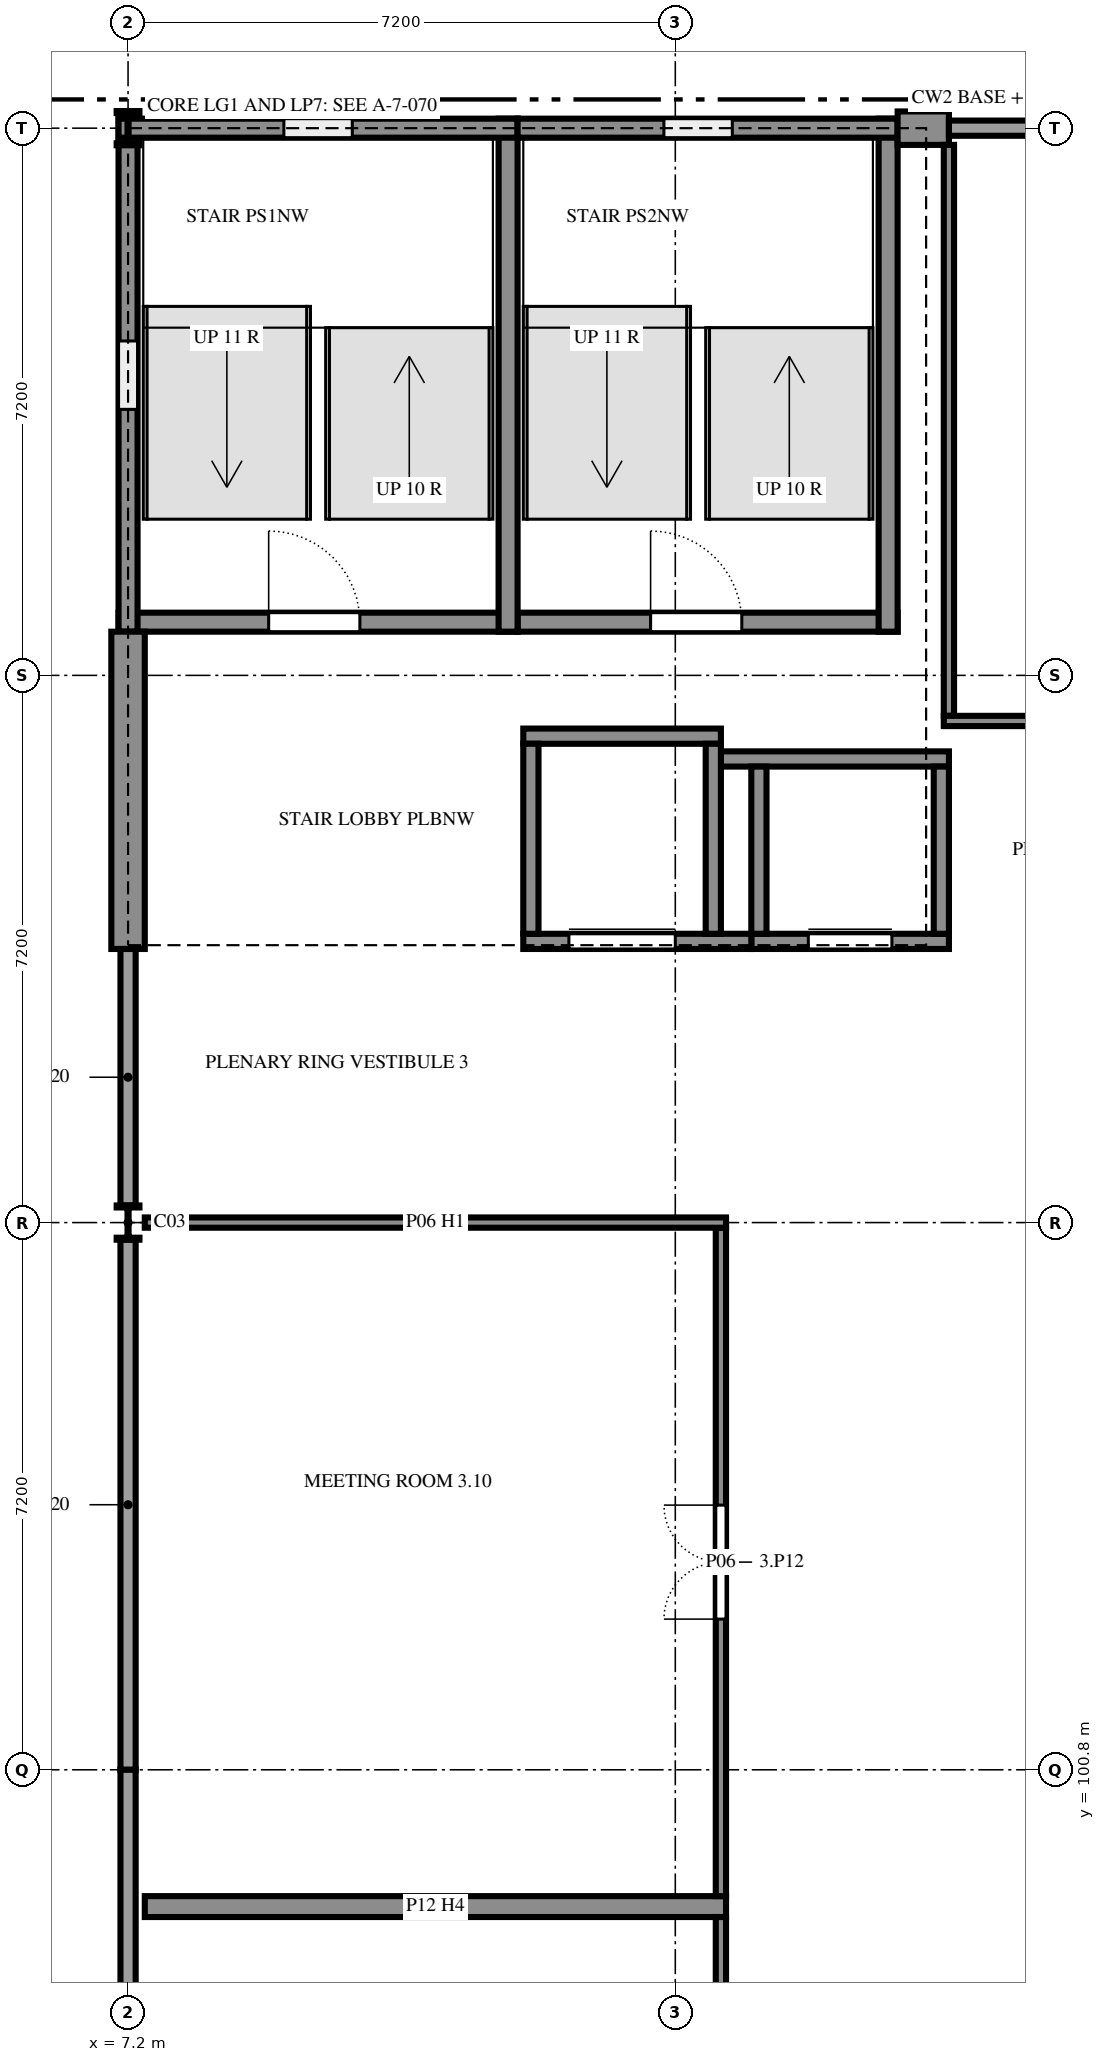
"""IFC4 building model, lengths in metres.
Left out: names, types, materials, properties, quantities, classifications, styles, units other than length and angle.
Written with IfcOpenShell. Run it as: python <this file> out.ifc"""

import sys

from ifc_helpers import new_model, si_unit, direction, frame, frame_2d, origin, origin_2d, place, context, subcontext, project, spatial, rectangle, i_section, extrude, element, fill, save


model = new_model("IFC4")
c1 = context("Model", 3, precision=1e-05, world=origin(), true_north=direction((0.0, 1.0)))
c2 = subcontext(c1, "Body", "Model", "MODEL_VIEW")
j1 = project(units=[si_unit("LENGTHUNIT", "METRE"), si_unit("PLANEANGLEUNIT", "RADIAN")], contexts=[c1])
p1 = place(None, origin())
s1 = spatial("IfcSite", under=j1, at=p1, CompositionType="ELEMENT")
p2 = place(p1, origin())
s2 = spatial("IfcBuilding", under=s1, at=p2, CompositionType="ELEMENT")
p3 = place(p2, frame((0.0, 0.0, 10.8)))
s3 = spatial("IfcBuildingStorey", under=s2, at=p3, CompositionType="ELEMENT", Elevation=10.8)
for number, where, z_axis, x_axis in (
    (1, (7.2, 108.0, 0.0), (0.0, 0.0, 1.0), (1.0, 0.0, 0.0)),
    (2, (7.2, 122.4, 0.0), (0.0, 0.0, 1.0), (1.0, 0.0, 0.0)),
):
    element("IfcColumn", number, at=place(p3, frame(where, z_axis=z_axis, x_axis=x_axis)), inside=s3, PredefinedType="COLUMN", context=c2, shape_type="SweptSolid", body=[
        extrude(i_section(OverallWidth=0.3, OverallDepth=0.45, WebThickness=0.014, FlangeThickness=0.026, FilletRadius=0.027, at=origin_2d()), origin(), (0.0, 0.0, 1.0), 3.6),
    ])
p4 = place(p3, frame((7.075, 115.9, 0.0), z_axis=(0.0, 0.0, 1.0), x_axis=(1.0, 0.0, 0.0)))
e3 = element("IfcWall", 3, at=p4, inside=s3, PredefinedType="SHEAR", context=c2, shape_type="SweptSolid", body=[
    extrude(rectangle(XDim=5.25, YDim=0.25, at=frame_2d((2.625, 0.0))), origin(), (0.0, 0.0, 1.0), 3.6),
])
p5 = place(p4, frame((1.975, 0.0, 0.0)))
e4 = element("IfcOpeningElement", 4, at=p5, cuts=e3, PredefinedType="OPENING", context=c2, shape_type="SweptSolid", body=[
    extrude(rectangle(XDim=1.2, YDim=2.4, at=frame_2d((0.6, 1.2))), frame((0.0, 0.135, 0.0), z_axis=(0.0, -1.0, 0.0), x_axis=(1.0, 0.0, 0.0)), (0.0, 0.0, 1.0), 0.27),
])
p6 = place(p3, frame((12.325, 115.9, 0.0), z_axis=(0.0, 0.0, 1.0), x_axis=(1.0, 0.0, 0.0)))
e5 = element("IfcWall", 5, at=p6, inside=s3, PredefinedType="SHEAR", context=c2, shape_type="SweptSolid", body=[
    extrude(rectangle(XDim=5.0, YDim=0.25, at=frame_2d((2.5, 0.0))), origin(), (0.0, 0.0, 1.0), 3.6),
])
p7 = place(p6, frame((1.75, 0.0, 0.0)))
e6 = element("IfcOpeningElement", 6, at=p7, cuts=e5, PredefinedType="OPENING", context=c2, shape_type="SweptSolid", body=[
    extrude(rectangle(XDim=1.2, YDim=2.4, at=frame_2d((0.6, 1.2))), frame((0.0, 0.135, 0.0), z_axis=(0.0, -1.0, 0.0), x_axis=(1.0, 0.0, 0.0)), (0.0, 0.0, 1.0), 0.27),
])
for number, where, z_axis, x_axis in (
    (7, (12.2, 115.775, 0.0), (0.0, 0.0, 1.0), (0.0, 1.0, 0.0)),
    (8, (17.2, 115.775, 0.0), (0.0, 0.0, 1.0), (0.0, 1.0, 0.0)),
):
    element("IfcWall", number, at=place(p3, frame(where, z_axis=z_axis, x_axis=x_axis)), inside=s3, PredefinedType="SHEAR", context=c2, shape_type="SweptSolid", body=[
        extrude(rectangle(XDim=6.75, YDim=0.25, at=frame_2d((3.375, 0.0))), origin(), (0.0, 0.0, 1.0), 3.6),
    ])
p8 = place(p3, frame((7.2, 122.525, 0.0), z_axis=(0.0, 0.0, 1.0), x_axis=(0.0, -1.0, 0.0)))
e9 = element("IfcWall", 9, at=p8, inside=s3, PredefinedType="SHEAR", context=c2, shape_type="SweptSolid", body=[
    extrude(rectangle(XDim=6.75, YDim=0.25, at=frame_2d((3.375, 0.0))), origin(), (0.0, 0.0, 1.0), 3.6),
])
p9 = place(p8, frame((2.925, 0.0, 0.6)))
e10 = element("IfcOpeningElement", 10, at=p9, cuts=e9, PredefinedType="OPENING", context=c2, shape_type="SweptSolid", body=[
    extrude(rectangle(XDim=0.9, YDim=2.1, at=frame_2d((0.45, 1.05))), frame((0.0, 0.135, 0.0), z_axis=(0.0, -1.0, 0.0), x_axis=(1.0, 0.0, 0.0)), (0.0, 0.0, 1.0), 0.27),
])
p10 = place(p3, frame((12.325, 122.4, 0.0), z_axis=(0.0, 0.0, 1.0), x_axis=(-1.0, 0.0, 0.0)))
e11 = element("IfcWall", 11, at=p10, inside=s3, PredefinedType="SHEAR", context=c2, shape_type="SweptSolid", body=[
    extrude(rectangle(XDim=5.25, YDim=0.25, at=frame_2d((2.625, 0.0))), origin(), (0.0, 0.0, 1.0), 3.6),
])
p11 = place(p10, frame((2.175, 0.0, 0.6)))
e12 = element("IfcOpeningElement", 12, at=p11, cuts=e11, PredefinedType="OPENING", context=c2, shape_type="SweptSolid", body=[
    extrude(rectangle(XDim=0.9, YDim=2.1, at=frame_2d((0.45, 1.05))), frame((0.0, 0.135, 0.0), z_axis=(0.0, -1.0, 0.0), x_axis=(1.0, 0.0, 0.0)), (0.0, 0.0, 1.0), 0.27),
])
p12 = place(p3, frame((17.325, 122.4, 0.0), z_axis=(0.0, 0.0, 1.0), x_axis=(-1.0, 0.0, 0.0)))
e13 = element("IfcWall", 13, at=p12, inside=s3, PredefinedType="SHEAR", context=c2, shape_type="SweptSolid", body=[
    extrude(rectangle(XDim=5.0, YDim=0.25, at=frame_2d((2.5, 0.0))), origin(), (0.0, 0.0, 1.0), 3.6),
])
p13 = place(p12, frame((2.175, 0.0, 0.6)))
e14 = element("IfcOpeningElement", 14, at=p13, cuts=e13, PredefinedType="OPENING", context=c2, shape_type="SweptSolid", body=[
    extrude(rectangle(XDim=0.9, YDim=2.1, at=frame_2d((0.45, 1.05))), frame((0.0, 0.135, 0.0), z_axis=(0.0, -1.0, 0.0), x_axis=(1.0, 0.0, 0.0)), (0.0, 0.0, 1.0), 0.27),
])
p14 = place(p3, frame((18.0, 122.4, 0.0), z_axis=(0.0, 0.0, 1.0), x_axis=(-1.0, 0.0, 0.0)))
e15 = element("IfcWall", 15, at=p14, inside=s3, PredefinedType="SOLIDWALL", context=c2, shape_type="SweptSolid", body=[
    extrude(rectangle(XDim=0.675, YDim=0.44, at=frame_2d((0.337, 0.0))), origin(), (0.0, 0.0, 1.0), 3.42),
])
p15 = place(p3, frame((7.2, 115.775, 0.0), z_axis=(0.0, 0.0, 1.0), x_axis=(0.0, -1.0, 0.0)))
e16 = element("IfcWall", 16, at=p15, inside=s3, PredefinedType="SOLIDWALL", context=c2, shape_type="SweptSolid", body=[
    extrude(rectangle(XDim=4.175, YDim=0.44, at=frame_2d((2.087, 0.0))), origin(), (0.0, 0.0, 1.0), 3.42),
])
p16 = place(p3, frame((15.4, 111.7, 0.0), z_axis=(0.0, 0.0, 1.0), x_axis=(1.0, 0.0, 0.0)))
e17 = element("IfcWall", 17, at=p16, inside=s3, PredefinedType="SHEAR", context=c2, shape_type="SweptSolid", body=[
    extrude(rectangle(XDim=2.6, YDim=0.2, at=frame_2d((1.3, 0.0))), origin(), (0.0, 0.0, 1.0), 3.6),
])
p17 = place(p16, frame((0.75, 0.0, 0.0)))
e18 = element("IfcOpeningElement", 18, at=p17, cuts=e17, PredefinedType="OPENING", context=c2, shape_type="SweptSolid", body=[
    extrude(rectangle(XDim=1.1, YDim=2.1, at=frame_2d((0.55, 1.05))), frame((0.0, 0.11, 0.0), z_axis=(0.0, -1.0, 0.0), x_axis=(1.0, 0.0, 0.0)), (0.0, 0.0, 1.0), 0.22),
])
p18 = place(p3, frame((15.0, 114.1, 0.0), z_axis=(0.0, 0.0, 1.0), x_axis=(1.0, 0.0, 0.0)))
e19 = element("IfcWall", 19, at=p18, inside=s3, PredefinedType="SHEAR", context=c2, shape_type="SweptSolid", body=[
    extrude(rectangle(XDim=3.0, YDim=0.2, at=frame_2d((1.5, 0.0))), origin(), (0.0, 0.0, 1.0), 3.6),
])
for number, where, z_axis, x_axis in (
    (20, (15.5, 111.8, 0.0), (0.0, 0.0, 1.0), (0.0, 1.0, 0.0)),
    (21, (17.9, 111.8, 0.0), (0.0, 0.0, 1.0), (0.0, 1.0, 0.0)),
):
    element("IfcWall", number, at=place(p3, frame(where, z_axis=z_axis, x_axis=x_axis)), inside=s3, PredefinedType="SHEAR", context=c2, shape_type="SweptSolid", body=[
        extrude(rectangle(XDim=2.2, YDim=0.2, at=frame_2d((1.1, 0.0))), origin(), (0.0, 0.0, 1.0), 3.6),
    ])
p19 = place(p3, frame((12.4, 111.7, 0.0), z_axis=(0.0, 0.0, 1.0), x_axis=(1.0, 0.0, 0.0)))
e22 = element("IfcWall", 22, at=p19, inside=s3, PredefinedType="SHEAR", context=c2, shape_type="SweptSolid", body=[
    extrude(rectangle(XDim=3.0, YDim=0.2, at=frame_2d((1.5, 0.0))), origin(), (0.0, 0.0, 1.0), 3.6),
])
p20 = place(p19, frame((0.6, 0.0, 0.0)))
e23 = element("IfcOpeningElement", 23, at=p20, cuts=e22, PredefinedType="OPENING", context=c2, shape_type="SweptSolid", body=[
    extrude(rectangle(XDim=1.4, YDim=2.1, at=frame_2d((0.7, 1.05))), frame((0.0, 0.11, 0.0), z_axis=(0.0, -1.0, 0.0), x_axis=(1.0, 0.0, 0.0)), (0.0, 0.0, 1.0), 0.22),
])
p21 = place(p3, frame((12.4, 114.4, 0.0), z_axis=(0.0, 0.0, 1.0), x_axis=(1.0, 0.0, 0.0)))
e24 = element("IfcWall", 24, at=p21, inside=s3, PredefinedType="SHEAR", context=c2, shape_type="SweptSolid", body=[
    extrude(rectangle(XDim=2.6, YDim=0.2, at=frame_2d((1.3, 0.0))), origin(), (0.0, 0.0, 1.0), 3.6),
])
for number, where, z_axis, x_axis in (
    (25, (12.5, 111.8, 0.0), (0.0, 0.0, 1.0), (0.0, 1.0, 0.0)),
    (26, (14.9, 111.8, 0.0), (0.0, 0.0, 1.0), (0.0, 1.0, 0.0)),
):
    element("IfcWall", number, at=place(p3, frame(where, z_axis=z_axis, x_axis=x_axis)), inside=s3, PredefinedType="SHEAR", context=c2, shape_type="SweptSolid", body=[
        extrude(rectangle(XDim=2.5, YDim=0.2, at=frame_2d((1.25, 0.0))), origin(), (0.0, 0.0, 1.0), 3.6),
    ])
p22 = place(p3, frame((18.0, 122.18, 0.0), z_axis=(0.0, 0.0, 1.0), x_axis=(0.0, -1.0, 0.0)))
e27 = element("IfcWall", 27, at=p22, inside=s3, PredefinedType="PARTITIONING", context=c2, shape_type="SweptSolid", body=[
    extrude(rectangle(XDim=7.512, YDim=0.135, at=frame_2d((3.756, 0.0))), origin(), (0.0, 0.0, 1.0), 3.12),
])
p23 = place(p3, frame((7.42, 99.0, 0.0), z_axis=(0.0, 0.0, 1.0), x_axis=(1.0, 0.0, 0.0)))
e28 = element("IfcWall", 28, at=p23, inside=s3, PredefinedType="PARTITIONING", context=c2, shape_type="SweptSolid", body=[
    extrude(rectangle(XDim=7.647, YDim=0.275, at=frame_2d((3.824, 0.0))), origin(), (0.0, 0.0, 1.0), 3.42),
])
p24 = place(p3, frame((15.0, 98.863, 0.0), z_axis=(0.0, 0.0, 1.0), x_axis=(0.0, -1.0, 0.0)))
e29 = element("IfcWall", 29, at=p24, inside=s3, PredefinedType="PARTITIONING", context=c2, shape_type="SweptSolid", body=[
    extrude(rectangle(XDim=12.325, YDim=0.135, at=frame_2d((6.163, 0.0))), origin(), (0.0, 0.0, 1.0), 3.42),
])
p25 = place(p24, frame((5.45, 0.0, 0.0)))
e30 = element("IfcOpeningElement", 30, at=p25, cuts=e29, PredefinedType="OPENING", context=c2, shape_type="SweptSolid", body=[
    extrude(rectangle(XDim=1.5, YDim=2.1, at=frame_2d((0.75, 1.05))), frame((0.0, 0.077, 0.0), z_axis=(0.0, -1.0, 0.0), x_axis=(1.0, 0.0, 0.0)), (0.0, 0.0, 1.0), 0.155),
])
p26 = place(p3, frame((15.0, 107.933, 0.0), z_axis=(0.0, 0.0, 1.0), x_axis=(0.0, -1.0, 0.0)))
e31 = element("IfcWall", 31, at=p26, inside=s3, PredefinedType="PARTITIONING", context=c2, shape_type="SweptSolid", body=[
    extrude(rectangle(XDim=8.795, YDim=0.135, at=frame_2d((4.397, 0.0))), origin(), (0.0, 0.0, 1.0), 3.42),
])
p27 = place(p26, frame((3.65, 0.0, 0.0)))
e32 = element("IfcOpeningElement", 32, at=p27, cuts=e31, PredefinedType="OPENING", context=c2, shape_type="SweptSolid", body=[
    extrude(rectangle(XDim=1.5, YDim=2.1, at=frame_2d((0.75, 1.05))), frame((0.0, 0.077, 0.0), z_axis=(0.0, -1.0, 0.0), x_axis=(1.0, 0.0, 0.0)), (0.0, 0.0, 1.0), 0.155),
])
p28 = place(p3, frame((7.42, 108.0, 0.0), z_axis=(0.0, 0.0, 1.0), x_axis=(1.0, 0.0, 0.0)))
e33 = element("IfcWall", 33, at=p28, inside=s3, PredefinedType="PARTITIONING", context=c2, shape_type="SweptSolid", body=[
    extrude(rectangle(XDim=7.647, YDim=0.135, at=frame_2d((3.824, 0.0))), origin(), (0.0, 0.0, 1.0), 2.82),
])
p29 = place(p3, frame((30.6, 114.6, 0.0), z_axis=(0.0, 0.0, 1.0), x_axis=(-1.0, 0.0, 0.0)))
e34 = element("IfcWall", 34, at=p29, inside=s3, PredefinedType="PARTITIONING", context=c2, shape_type="SweptSolid", body=[
    extrude(rectangle(XDim=12.667, YDim=0.135, at=frame_2d((6.334, 0.0))), origin(), (0.0, 0.0, 1.0), 3.42),
])
p30 = place(p29, frame((5.55, 0.0, 0.0)))
e35 = element("IfcOpeningElement", 35, at=p30, cuts=e34, PredefinedType="OPENING", context=c2, shape_type="SweptSolid", body=[
    extrude(rectangle(XDim=1.5, YDim=2.1, at=frame_2d((0.75, 1.05))), frame((0.0, 0.077, 0.0), z_axis=(0.0, -1.0, 0.0), x_axis=(1.0, 0.0, 0.0)), (0.0, 0.0, 1.0), 0.155),
])
p31 = place(p13, origin())
e36 = element("IfcWindow", 36, at=p31, inside=s3, PartitioningType="SINGLE_PANEL", PredefinedType="WINDOW", context=c2, shape_type="SweptSolid", body=[
    extrude(rectangle(XDim=0.9, YDim=2.1, at=frame_2d((0.45, 1.05))), frame((0.0, 0.03, 0.0), z_axis=(0.0, -1.0, 0.0), x_axis=(1.0, 0.0, 0.0)), (0.0, 0.0, 1.0), 0.06),
])
fill(e14, e36)
p32 = place(p11, origin())
e37 = element("IfcWindow", 37, at=p32, inside=s3, PartitioningType="SINGLE_PANEL", PredefinedType="WINDOW", context=c2, shape_type="SweptSolid", body=[
    extrude(rectangle(XDim=0.9, YDim=2.1, at=frame_2d((0.45, 1.05))), frame((0.0, 0.03, 0.0), z_axis=(0.0, -1.0, 0.0), x_axis=(1.0, 0.0, 0.0)), (0.0, 0.0, 1.0), 0.06),
])
fill(e12, e37)
p33 = place(p9, origin())
e38 = element("IfcWindow", 38, at=p33, inside=s3, PartitioningType="SINGLE_PANEL", PredefinedType="WINDOW", context=c2, shape_type="SweptSolid", body=[
    extrude(rectangle(XDim=0.9, YDim=2.1, at=frame_2d((0.45, 1.05))), frame((0.0, 0.03, 0.0), z_axis=(0.0, -1.0, 0.0), x_axis=(1.0, 0.0, 0.0)), (0.0, 0.0, 1.0), 0.06),
])
fill(e10, e38)
p34 = place(p17, origin())
e39 = element("IfcDoor", 39, at=p34, inside=s3, OperationType="SLIDING_TO_LEFT", PredefinedType="DOOR", context=c2, shape_type="SweptSolid", body=[
    extrude(rectangle(XDim=1.1, YDim=2.1, at=frame_2d((0.55, 1.05))), frame((0.0, 0.025, 0.0), z_axis=(0.0, -1.0, 0.0), x_axis=(1.0, 0.0, 0.0)), (0.0, 0.0, 1.0), 0.05),
])
fill(e18, e39)
p35 = place(p20, origin())
e40 = element("IfcDoor", 40, at=p35, inside=s3, OperationType="SLIDING_TO_LEFT", PredefinedType="DOOR", context=c2, shape_type="SweptSolid", body=[
    extrude(rectangle(XDim=1.4, YDim=2.1, at=frame_2d((0.7, 1.05))), frame((0.0, 0.025, 0.0), z_axis=(0.0, -1.0, 0.0), x_axis=(1.0, 0.0, 0.0)), (0.0, 0.0, 1.0), 0.05),
])
fill(e23, e40)
p36 = place(p5, origin())
e41 = element("IfcDoor", 41, at=p36, inside=s3, OperationType="SINGLE_SWING_RIGHT", PredefinedType="DOOR", context=c2, shape_type="SweptSolid", body=[
    extrude(rectangle(XDim=1.2, YDim=2.4, at=frame_2d((0.6, 1.2))), frame((0.0, 0.025, 0.0), z_axis=(0.0, -1.0, 0.0), x_axis=(1.0, 0.0, 0.0)), (0.0, 0.0, 1.0), 0.05),
])
fill(e4, e41)
p37 = place(p7, origin())
e42 = element("IfcDoor", 42, at=p37, inside=s3, OperationType="SINGLE_SWING_RIGHT", PredefinedType="DOOR", context=c2, shape_type="SweptSolid", body=[
    extrude(rectangle(XDim=1.2, YDim=2.4, at=frame_2d((0.6, 1.2))), frame((0.0, 0.025, 0.0), z_axis=(0.0, -1.0, 0.0), x_axis=(1.0, 0.0, 0.0)), (0.0, 0.0, 1.0), 0.05),
])
fill(e6, e42)
p38 = place(p27, frame((1.5, 0.0, 0.0), z_axis=(0.0, 0.0, 1.0), x_axis=(-1.0, 0.0, 0.0)))
e43 = element("IfcDoor", 43, at=p38, inside=s3, OperationType="DOUBLE_DOOR_SINGLE_SWING", PredefinedType="DOOR", context=c2, shape_type="SweptSolid", body=[
    extrude(rectangle(XDim=1.5, YDim=2.1, at=frame_2d((0.75, 1.05))), frame((0.0, 0.025, 0.0), z_axis=(0.0, -1.0, 0.0), x_axis=(1.0, 0.0, 0.0)), (0.0, 0.0, 1.0), 0.05),
])
fill(e32, e43)
save(model, sys.argv[1])
